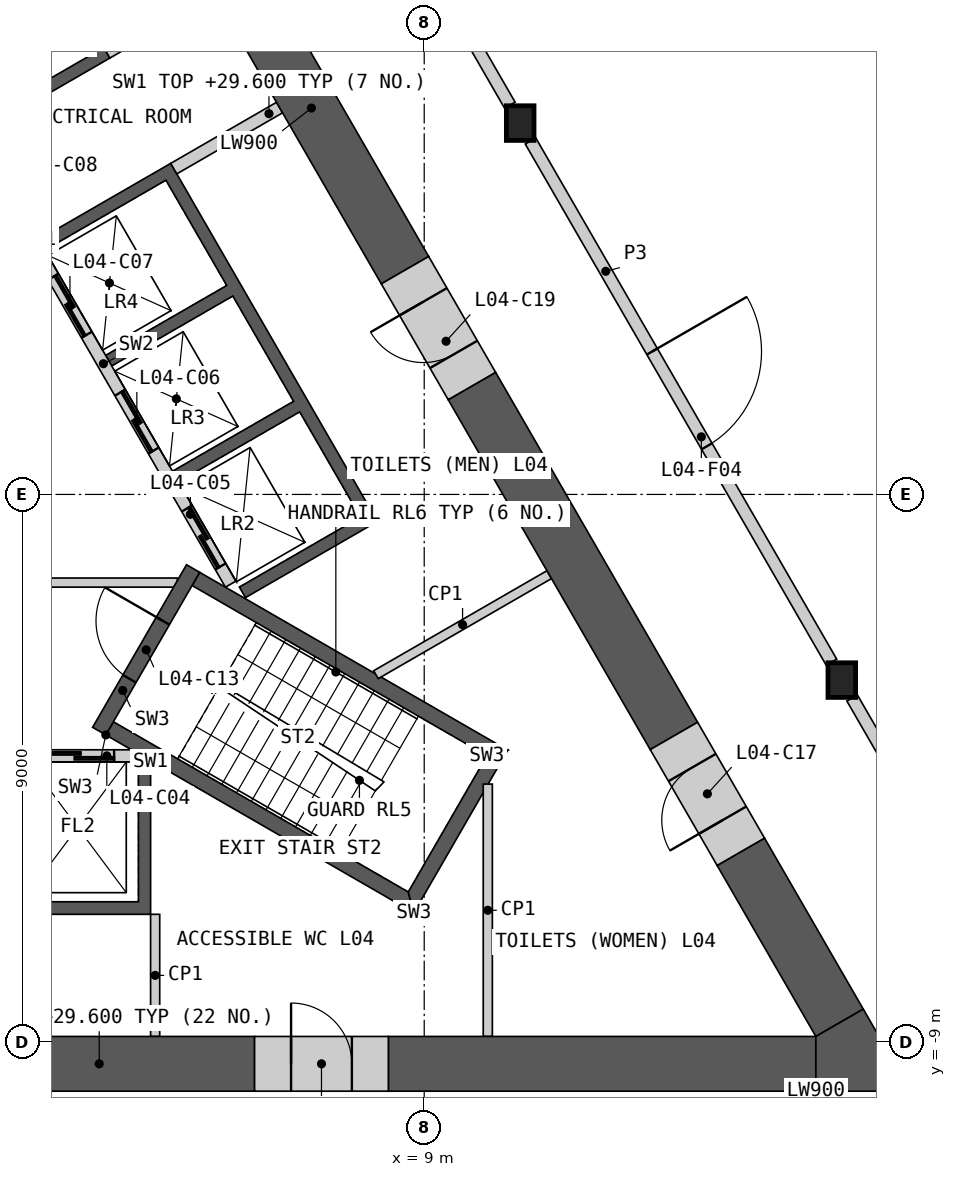
"""IFC4 building model, lengths in metres.
Left out: names, types, materials, properties, quantities, classifications, styles, units other than length and angle.
Written with IfcOpenShell. Run it as: python <this file> out.ifc"""

import sys

from ifc_helpers import new_model, si_unit, direction, frame, frame_2d, origin, origin_2d, place, context, subcontext, project, spatial, polyline, rectangle, i_section, outline, extrude, element, fill, save


model = new_model("IFC4")
c1 = context("Model", 3, precision=1e-05, world=origin(), true_north=direction((0.0, 1.0)))
c2 = subcontext(c1, "Body", "Model", "MODEL_VIEW")
j1 = project(units=[si_unit("LENGTHUNIT", "METRE"), si_unit("PLANEANGLEUNIT", "RADIAN")], contexts=[c1])
p1 = place(None, origin())
s1 = spatial("IfcSite", under=j1, at=p1, CompositionType="ELEMENT")
p2 = place(p1, origin())
s2 = spatial("IfcBuilding", under=s1, at=p2, CompositionType="ELEMENT")
p3 = place(p2, frame((0.0, 0.0, 25.5)))
s3 = spatial("IfcBuildingStorey", under=s2, at=p3, CompositionType="ELEMENT", Elevation=25.5)
for number, where, z_axis, x_axis in (
    (1, (15.868, -3.054, 0.0), (0.0, 0.0, 1.0), (1.0, 0.0, 0.0)),
    (2, (10.578, 6.107, 0.0), (0.0, 0.0, 1.0), (1.0, 0.0, 0.0)),
):
    element("IfcColumn", number, at=place(p3, frame(where, z_axis=z_axis, x_axis=x_axis)), inside=s3, PredefinedType="COLUMN", context=c2, shape_type="SweptSolid", body=[
        extrude(i_section(OverallWidth=0.454, OverallDepth=0.57, WebThickness=0.078, FlangeThickness=0.125, at=origin_2d()), origin(), (0.0, 0.0, 1.0), 4.5),
    ])
p4 = place(p3, origin())
e3 = element("IfcWall", 3, at=p4, inside=s3, PredefinedType="SHEAR", context=c2, shape_type="SweptSolid", body=[
    extrude(outline(polyline([(4.5, -4.4), (4.5, -6.906), (-4.5, -6.906), (-4.5, -4.4), (-4.3, -4.4), (-4.3, -6.7), (-2.3, -6.7), (-2.3, -4.4), (-2.1, -4.4), (-2.1, -6.7), (-0.1, -6.7), (-0.1, -4.4), (0.1, -4.4), (0.1, -6.7), (2.1, -6.7), (2.1, -4.4), (2.3, -4.4), (2.3, -6.7), (4.3, -6.7), (4.3, -4.4), (4.5, -4.4)])), origin(), (0.0, 0.0, 1.0), 4.1),
])
p5 = place(p3, frame((-4.187, -4.3, 0.0), z_axis=(0.0, 0.0, 1.0), x_axis=(1.0, 0.0, 0.0)))
e4 = element("IfcWall", 4, at=p5, inside=s3, PredefinedType="SOLIDWALL", context=c2, shape_type="SweptSolid", body=[
    extrude(rectangle(XDim=8.373, YDim=0.2, at=frame_2d((4.187, 0.0))), origin(), (0.0, 0.0, 1.0), 4.1),
])
p6 = place(p5, frame((0.287, 0.0, 0.0)))
e5 = element("IfcOpeningElement", 5, at=p6, cuts=e4, PredefinedType="OPENING", context=c2, shape_type="SweptSolid", body=[
    extrude(rectangle(XDim=1.2, YDim=2.1, at=frame_2d((0.6, 1.05))), frame((0.0, 0.11, 0.0), z_axis=(0.0, -1.0, 0.0), x_axis=(1.0, 0.0, 0.0)), (0.0, 0.0, 1.0), 0.22),
])
p7 = place(p5, frame((2.387, 0.0, 0.0)))
e6 = element("IfcOpeningElement", 6, at=p7, cuts=e4, PredefinedType="OPENING", context=c2, shape_type="SweptSolid", body=[
    extrude(rectangle(XDim=1.4, YDim=2.1, at=frame_2d((0.7, 1.05))), frame((0.0, 0.11, 0.0), z_axis=(0.0, -1.0, 0.0), x_axis=(1.0, 0.0, 0.0)), (0.0, 0.0, 1.0), 0.22),
])
p8 = place(p5, frame((4.737, 0.0, 0.0)))
e7 = element("IfcOpeningElement", 7, at=p8, cuts=e4, PredefinedType="OPENING", context=c2, shape_type="SweptSolid", body=[
    extrude(rectangle(XDim=1.1, YDim=2.1, at=frame_2d((0.55, 1.05))), frame((0.0, 0.11, 0.0), z_axis=(0.0, -1.0, 0.0), x_axis=(1.0, 0.0, 0.0)), (0.0, 0.0, 1.0), 0.22),
])
p9 = place(p5, frame((6.887, 0.0, 0.0)))
e8 = element("IfcOpeningElement", 8, at=p9, cuts=e4, PredefinedType="OPENING", context=c2, shape_type="SweptSolid", body=[
    extrude(rectangle(XDim=1.2, YDim=2.1, at=frame_2d((0.6, 1.05))), frame((0.0, 0.11, 0.0), z_axis=(0.0, -1.0, 0.0), x_axis=(1.0, 0.0, 0.0)), (0.0, 0.0, 1.0), 0.22),
])
p10 = place(p3, origin())
e9 = element("IfcWall", 9, at=p10, inside=s3, PredefinedType="SHEAR", context=c2, shape_type="SweptSolid", body=[
    extrude(outline(polyline([(1.561, 6.097), (3.731, 7.35), (3.831, 7.177), (1.66, 5.924), (1.561, 6.097)])), origin(), (0.0, 0.0, 1.0), 4.1),
])
p11 = place(p3, origin())
e10 = element("IfcWall", 10, at=p11, inside=s3, PredefinedType="SHEAR", context=c2, shape_type="SweptSolid", body=[
    extrude(outline(polyline([(2.66, 4.192), (4.831, 5.445), (8.231, -0.444), (6.061, -1.697), (5.96, -1.524), (7.952, -0.374), (6.952, 1.358), (4.96, 0.208), (4.861, 0.381), (6.852, 1.531), (5.852, 3.263), (3.861, 2.113), (3.76, 2.287), (5.752, 3.437), (4.752, 5.169), (2.76, 4.019), (2.66, 4.192)])), origin(), (0.0, 0.0, 1.0), 4.1),
])
p12 = place(p3, frame((5.817, -1.476, 0.0), z_axis=(0.0, 0.0, 1.0), x_axis=(-0.500002616675, 0.866023893041, 0.0)))
e11 = element("IfcWall", 11, at=p12, inside=s3, PredefinedType="SOLIDWALL", context=c2, shape_type="SweptSolid", body=[
    extrude(rectangle(XDim=8.373, YDim=0.2, at=frame_2d((4.187, 0.0))), origin(), (0.0, 0.0, 1.0), 4.1),
])
p13 = place(p12, frame((0.337, 0.0, 0.0)))
e12 = element("IfcOpeningElement", 12, at=p13, cuts=e11, PredefinedType="OPENING", context=c2, shape_type="SweptSolid", body=[
    extrude(rectangle(XDim=1.1, YDim=2.1, at=frame_2d((0.55, 1.05))), frame((0.0, 0.11, 0.0), z_axis=(0.0, -1.0, 0.0), x_axis=(1.0, 0.0, 0.0)), (0.0, 0.0, 1.0), 0.22),
])
p14 = place(p12, frame((2.537, 0.0, 0.0)))
e13 = element("IfcOpeningElement", 13, at=p14, cuts=e11, PredefinedType="OPENING", context=c2, shape_type="SweptSolid", body=[
    extrude(rectangle(XDim=1.1, YDim=2.1, at=frame_2d((0.55, 1.05))), frame((0.0, 0.11, 0.0), z_axis=(0.0, -1.0, 0.0), x_axis=(1.0, 0.0, 0.0)), (0.0, 0.0, 1.0), 0.22),
])
p15 = place(p12, frame((4.737, 0.0, 0.0)))
e14 = element("IfcOpeningElement", 14, at=p15, cuts=e11, PredefinedType="OPENING", context=c2, shape_type="SweptSolid", body=[
    extrude(rectangle(XDim=1.1, YDim=2.1, at=frame_2d((0.55, 1.05))), frame((0.0, 0.11, 0.0), z_axis=(0.0, -1.0, 0.0), x_axis=(1.0, 0.0, 0.0)), (0.0, 0.0, 1.0), 0.22),
])
p16 = place(p12, frame((7.037, 0.0, 0.0)))
e15 = element("IfcOpeningElement", 15, at=p16, cuts=e11, PredefinedType="OPENING", context=c2, shape_type="SweptSolid", body=[
    extrude(rectangle(XDim=0.9, YDim=2.1, at=frame_2d((0.45, 1.05))), frame((0.0, 0.11, 0.0), z_axis=(0.0, -1.0, 0.0), x_axis=(1.0, 0.0, 0.0)), (0.0, 0.0, 1.0), 0.22),
])
p17 = place(p3, frame((4.881, 5.358, 0.0), z_axis=(0.0, 0.0, 1.0), x_axis=(0.866035824272, 0.499981950752, 0.0)))
e16 = element("IfcWall", 16, at=p17, inside=s3, PredefinedType="SHEAR", context=c2, shape_type="SweptSolid", body=[
    extrude(rectangle(XDim=2.009, YDim=0.2, at=frame_2d((1.004, 0.0))), origin(), (0.0, 0.0, 1.0), 4.1),
])
p18 = place(p3, frame((3.781, 7.263, 0.0), z_axis=(0.0, 0.0, 1.0), x_axis=(0.865983199114, 0.50007309351, 0.0)))
e17 = element("IfcWall", 17, at=p18, inside=s3, PredefinedType="SHEAR", context=c2, shape_type="SweptSolid", body=[
    extrude(rectangle(XDim=2.009, YDim=0.2, at=frame_2d((1.004, 0.0))), origin(), (0.0, 0.0, 1.0), 4.1),
])
p19 = place(p3, frame((-4.941, -1.45, 0.0), z_axis=(0.0, 0.0, 1.0), x_axis=(1.0, 0.0, 0.0)))
e18 = element("IfcWall", 18, at=p19, inside=s3, PredefinedType="PARTITIONING", context=c2, shape_type="SweptSolid", body=[
    extrude(rectangle(XDim=9.882, YDim=0.15, at=frame_2d((4.941, 0.0))), origin(), (0.0, 0.0, 1.0), 4.1),
])
p20 = place(p19, frame((4.391, 0.0, 0.0)))
e19 = element("IfcOpeningElement", 19, at=p20, cuts=e18, PredefinedType="OPENING", context=c2, shape_type="SweptSolid", body=[
    extrude(rectangle(XDim=1.1, YDim=2.1, at=frame_2d((0.55, 1.05))), frame((0.0, 0.085, 0.0), z_axis=(0.0, -1.0, 0.0), x_axis=(1.0, 0.0, 0.0)), (0.0, 0.0, 1.0), 0.17),
])
p21 = place(p3, origin())
e20 = element("IfcWall", 20, at=p21, inside=s3, PredefinedType="SHEAR", context=c2, shape_type="SweptSolid", body=[
    extrude(outline(polyline([(3.763, -3.956), (8.83, -6.881), (8.738, -6.539), (3.888, -3.739), (3.763, -3.956)])), origin(), (0.0, 0.0, 1.0), 4.1),
])
p22 = place(p3, origin())
e21 = element("IfcWall", 21, at=p22, inside=s3, PredefinedType="SHEAR", context=c2, shape_type="SweptSolid", body=[
    extrude(outline(polyline([(8.83, -6.881), (10.374, -4.206), (10.032, -4.298), (8.738, -6.539), (8.83, -6.881)])), origin(), (0.0, 0.0, 1.0), 4.1),
])
p23 = place(p3, origin())
e22 = element("IfcWall", 22, at=p23, inside=s3, PredefinedType="SHEAR", context=c2, shape_type="SweptSolid", body=[
    extrude(outline(polyline([(10.032, -4.298), (10.374, -4.206), (5.307, -1.281), (5.182, -1.498), (10.032, -4.298)])), origin(), (0.0, 0.0, 1.0), 4.1),
])
p24 = place(p3, frame((3.655, -3.893, 0.0), z_axis=(0.0, 0.0, 1.0), x_axis=(0.499982516597, 0.866035497597, 0.0)))
e23 = element("IfcWall", 23, at=p24, inside=s3, PredefinedType="SHEAR", context=c2, shape_type="SweptSolid", body=[
    extrude(rectangle(XDim=3.088, YDim=0.25, at=frame_2d((1.544, 0.0))), origin(), (0.0, 0.0, 1.0), 4.1),
])
p25 = place(p24, frame((0.994, 0.0, 0.0)))
e24 = element("IfcOpeningElement", 24, at=p25, cuts=e23, PredefinedType="OPENING", context=c2, shape_type="SweptSolid", body=[
    extrude(rectangle(XDim=1.1, YDim=2.1, at=frame_2d((0.55, 1.05))), frame((0.0, 0.135, 0.0), z_axis=(0.0, -1.0, 0.0), x_axis=(1.0, 0.0, 0.0)), (0.0, 0.0, 1.0), 0.27),
])
p26 = place(p3, frame((4.575, -6.906, 0.0), z_axis=(0.0, 0.0, 1.0), x_axis=(0.0, -1.0, 0.0)))
e25 = element("IfcWall", 25, at=p26, inside=s3, PredefinedType="PARTITIONING", context=c2, shape_type="SweptSolid", body=[
    extrude(rectangle(XDim=2.009, YDim=0.15, at=frame_2d((1.004, 0.0))), origin(), (0.0, 0.0, 1.0), 4.1),
])
p27 = place(p3, frame((11.056, -1.32, 0.0), z_axis=(0.0, 0.0, 1.0), x_axis=(-0.866038565219, -0.499977203034, 0.0)))
e26 = element("IfcWall", 26, at=p27, inside=s3, PredefinedType="PARTITIONING", context=c2, shape_type="SweptSolid", body=[
    extrude(rectangle(XDim=3.291, YDim=0.15, at=frame_2d((1.646, 0.0))), origin(), (0.0, 0.0, 1.0), 4.1),
])
p28 = place(p3, frame((10.046, -8.915, 0.0), z_axis=(0.0, 0.0, 1.0), x_axis=(0.0, 1.0, 0.0)))
e27 = element("IfcWall", 27, at=p28, inside=s3, PredefinedType="PARTITIONING", context=c2, shape_type="SweptSolid", body=[
    extrude(rectangle(XDim=4.151, YDim=0.15, at=frame_2d((2.075, 0.0))), origin(), (0.0, 0.0, 1.0), 4.1),
])
p29 = place(p3, frame((8.41, -9.365, 0.0), z_axis=(0.0, 0.0, 1.0), x_axis=(1.0, 0.0, 0.0)))
e28 = element("IfcWall", 28, at=p29, inside=s3, PredefinedType="SHEAR", context=c2, shape_type="SweptSolid", body=[
    extrude(rectangle(XDim=7.031, YDim=0.9, at=frame_2d((3.515, 0.0))), origin(), (0.0, 0.0, 1.0), 4.1),
])
p30 = place(p3, frame((1.1, -9.365, 0.0), z_axis=(0.0, 0.0, 1.0), x_axis=(1.0, 0.0, 0.0)))
e29 = element("IfcWall", 29, at=p30, inside=s3, PredefinedType="SHEAR", context=c2, shape_type="SweptSolid", body=[
    extrude(rectangle(XDim=5.11, YDim=0.9, at=frame_2d((2.555, 0.0))), origin(), (0.0, 0.0, 1.0), 4.1),
])
p31 = place(p3, frame((13.107, -3.972, 0.0), z_axis=(0.0, 0.0, 1.0), x_axis=(-0.49998745675, 0.866032645512, 0.0)))
e30 = element("IfcWall", 30, at=p31, inside=s3, PredefinedType="SHEAR", context=c2, shape_type="SweptSolid", body=[
    extrude(rectangle(XDim=6.646, YDim=0.9, at=frame_2d((3.323, 0.0))), origin(), (0.0, 0.0, 1.0), 4.1),
])
p32 = place(p3, frame((8.684, 3.688, 0.0), z_axis=(0.0, 0.0, 1.0), x_axis=(-0.499990189338, 0.866031067899, 0.0)))
e31 = element("IfcWall", 31, at=p32, inside=s3, PredefinedType="SHEAR", context=c2, shape_type="SweptSolid", body=[
    extrude(rectangle(XDim=6.157, YDim=0.9, at=frame_2d((3.078, 0.0))), origin(), (0.0, 0.0, 1.0), 4.1),
])
p33 = place(p3, frame((15.831, -8.69, 0.0), z_axis=(0.0, 0.0, 1.0), x_axis=(-0.499963215419, 0.866046640331, 0.0)))
e32 = element("IfcWall", 32, at=p33, inside=s3, PredefinedType="SHEAR", context=c2, shape_type="SweptSolid", body=[
    extrude(rectangle(XDim=3.248, YDim=0.9, at=frame_2d((1.624, 0.0))), origin(), (0.0, 0.0, 1.0), 4.1),
])
p34 = place(p3, origin())
e33 = element("IfcWall", 33, at=p34, inside=s3, PredefinedType="SHEAR", context=c2, shape_type="SweptSolid", body=[
    extrude(outline(polyline([(15.441, -9.815), (15.441, -8.915), (16.221, -8.465), (17.0, -9.815), (15.441, -9.815)])), origin(), (0.0, 0.0, 1.0), 4.1),
])
p35 = place(p3, frame((6.21, -9.365, 0.0), z_axis=(0.0, 0.0, 1.0), x_axis=(1.0, 0.0, 0.0)))
e34 = element("IfcWall", 34, at=p35, inside=s3, PredefinedType="SHEAR", context=c2, shape_type="SweptSolid", body=[
    extrude(rectangle(XDim=2.2, YDim=0.9, at=frame_2d((1.1, 0.0))), origin(), (0.0, 0.0, 1.0), 4.1),
])
p36 = place(p35, frame((0.6, 0.0, 0.0)))
e35 = element("IfcOpeningElement", 35, at=p36, cuts=e34, PredefinedType="OPENING", context=c2, shape_type="SweptSolid", body=[
    extrude(rectangle(XDim=1.0, YDim=2.1, at=frame_2d((0.5, 1.05))), frame((0.0, 0.46, 0.0), z_axis=(0.0, -1.0, 0.0), x_axis=(1.0, 0.0, 0.0)), (0.0, 0.0, 1.0), 0.92),
])
p37 = place(p3, frame((14.207, -5.877, 0.0), z_axis=(0.0, 0.0, 1.0), x_axis=(-0.500077893725, 0.86598042715, 0.0)))
e36 = element("IfcWall", 36, at=p37, inside=s3, PredefinedType="SHEAR", context=c2, shape_type="SweptSolid", body=[
    extrude(rectangle(XDim=2.2, YDim=0.9, at=frame_2d((1.1, 0.0))), origin(), (0.0, 0.0, 1.0), 4.1),
])
p38 = place(p37, frame((0.6, 0.0, 0.0)))
e37 = element("IfcOpeningElement", 37, at=p38, cuts=e36, PredefinedType="OPENING", context=c2, shape_type="SweptSolid", body=[
    extrude(rectangle(XDim=1.0, YDim=2.1, at=frame_2d((0.5, 1.05))), frame((0.0, 0.46, 0.0), z_axis=(0.0, -1.0, 0.0), x_axis=(1.0, 0.0, 0.0)), (0.0, 0.0, 1.0), 0.92),
])
p39 = place(p3, frame((9.784, 1.783, 0.0), z_axis=(0.0, 0.0, 1.0), x_axis=(-0.50002983664, 0.866008176907, 0.0)))
e38 = element("IfcWall", 38, at=p39, inside=s3, PredefinedType="SHEAR", context=c2, shape_type="SweptSolid", body=[
    extrude(rectangle(XDim=2.2, YDim=0.9, at=frame_2d((1.1, 0.0))), origin(), (0.0, 0.0, 1.0), 4.1),
])
p40 = place(p39, frame((0.6, 0.0, 0.0)))
e39 = element("IfcOpeningElement", 39, at=p40, cuts=e38, PredefinedType="OPENING", context=c2, shape_type="SweptSolid", body=[
    extrude(rectangle(XDim=1.0, YDim=2.1, at=frame_2d((0.5, 1.05))), frame((0.0, 0.46, 0.0), z_axis=(0.0, -1.0, 0.0), x_axis=(1.0, 0.0, 0.0)), (0.0, 0.0, 1.0), 0.92),
])
p41 = place(p3, frame((10.749, 5.813, 0.0), z_axis=(0.0, 0.0, 1.0), x_axis=(0.500004292778, -0.866022925334, 0.0)))
e40 = element("IfcWall", 40, at=p41, inside=s3, PredefinedType="PARTITIONING", context=c2, shape_type="SweptSolid", body=[
    extrude(rectangle(XDim=9.898, YDim=0.2, at=frame_2d((4.949, 0.0))), origin(), (0.0, 0.0, 1.0), 4.1),
])
p42 = place(p41, frame((3.998, 0.0, 0.0)))
e41 = element("IfcOpeningElement", 41, at=p42, cuts=e40, PredefinedType="OPENING", context=c2, shape_type="SweptSolid", body=[
    extrude(rectangle(XDim=1.8, YDim=2.1, at=frame_2d((0.9, 1.05))), frame((0.0, 0.11, 0.0), z_axis=(0.0, -1.0, 0.0), x_axis=(1.0, 0.0, 0.0)), (0.0, 0.0, 1.0), 0.22),
])
p43 = place(p3, frame((5.459, 14.974, 0.0), z_axis=(0.0, 0.0, 1.0), x_axis=(0.499985793049, -0.866033606016, 0.0)))
e42 = element("IfcWall", 42, at=p43, inside=s3, PredefinedType="PARTITIONING", context=c2, shape_type="SweptSolid", body=[
    extrude(rectangle(XDim=9.898, YDim=0.2, at=frame_2d((4.949, 0.0))), origin(), (0.0, 0.0, 1.0), 4.1),
])
p44 = place(p3, frame((16.038, -3.348, 0.0), z_axis=(0.0, 0.0, 1.0), x_axis=(0.499988314375, -0.866032150378, 0.0)))
e43 = element("IfcWall", 43, at=p44, inside=s3, PredefinedType="PARTITIONING", context=c2, shape_type="SweptSolid", body=[
    extrude(rectangle(XDim=6.412, YDim=0.2, at=frame_2d((3.206, 0.0))), origin(), (0.0, 0.0, 1.0), 4.1),
])
p45 = place(p9, origin())
e44 = element("IfcDoor", 44, at=p45, inside=s3, OperationType="SLIDING_TO_LEFT", PredefinedType="DOOR", context=c2, shape_type="SweptSolid", body=[
    extrude(rectangle(XDim=1.2, YDim=2.1, at=frame_2d((0.6, 1.05))), frame((0.0, 0.025, 0.0), z_axis=(0.0, -1.0, 0.0), x_axis=(1.0, 0.0, 0.0)), (0.0, 0.0, 1.0), 0.05),
])
fill(e8, e44)
p46 = place(p13, origin())
e45 = element("IfcDoor", 45, at=p46, inside=s3, OperationType="SLIDING_TO_LEFT", PredefinedType="DOOR", context=c2, shape_type="SweptSolid", body=[
    extrude(rectangle(XDim=1.1, YDim=2.1, at=frame_2d((0.55, 1.05))), frame((0.0, 0.025, 0.0), z_axis=(0.0, -1.0, 0.0), x_axis=(1.0, 0.0, 0.0)), (0.0, 0.0, 1.0), 0.05),
])
fill(e12, e45)
p47 = place(p14, origin())
e46 = element("IfcDoor", 46, at=p47, inside=s3, OperationType="SLIDING_TO_LEFT", PredefinedType="DOOR", context=c2, shape_type="SweptSolid", body=[
    extrude(rectangle(XDim=1.1, YDim=2.1, at=frame_2d((0.55, 1.05))), frame((0.0, 0.025, 0.0), z_axis=(0.0, -1.0, 0.0), x_axis=(1.0, 0.0, 0.0)), (0.0, 0.0, 1.0), 0.05),
])
fill(e13, e46)
p48 = place(p15, origin())
e47 = element("IfcDoor", 47, at=p48, inside=s3, OperationType="SLIDING_TO_LEFT", PredefinedType="DOOR", context=c2, shape_type="SweptSolid", body=[
    extrude(rectangle(XDim=1.1, YDim=2.1, at=frame_2d((0.55, 1.05))), frame((0.0, 0.025, 0.0), z_axis=(0.0, -1.0, 0.0), x_axis=(1.0, 0.0, 0.0)), (0.0, 0.0, 1.0), 0.05),
])
fill(e14, e47)
p49 = place(p25, origin())
e48 = element("IfcDoor", 48, at=p49, inside=s3, OperationType="SINGLE_SWING_RIGHT", PredefinedType="DOOR", context=c2, shape_type="SweptSolid", body=[
    extrude(rectangle(XDim=1.1, YDim=2.1, at=frame_2d((0.55, 1.05))), frame((0.0, 0.025, 0.0), z_axis=(0.0, -1.0, 0.0), x_axis=(1.0, 0.0, 0.0)), (0.0, 0.0, 1.0), 0.05),
])
fill(e24, e48)
p50 = place(p36, origin())
e49 = element("IfcDoor", 49, at=p50, inside=s3, OperationType="SINGLE_SWING_LEFT", PredefinedType="DOOR", context=c2, shape_type="SweptSolid", body=[
    extrude(rectangle(XDim=1.0, YDim=2.1, at=frame_2d((0.5, 1.05))), frame((0.0, 0.205, 0.0), z_axis=(0.0, -1.0, 0.0), x_axis=(1.0, 0.0, 0.0)), (0.0, 0.0, 1.0), 0.05),
])
fill(e35, e49)
p51 = place(p38, origin())
e50 = element("IfcDoor", 50, at=p51, inside=s3, OperationType="SINGLE_SWING_LEFT", PredefinedType="DOOR", context=c2, shape_type="SweptSolid", body=[
    extrude(rectangle(XDim=1.0, YDim=2.1, at=frame_2d((0.5, 1.05))), frame((0.0, 0.205, 0.0), z_axis=(0.0, -1.0, 0.0), x_axis=(1.0, 0.0, 0.0)), (0.0, 0.0, 1.0), 0.05),
])
fill(e37, e50)
p52 = place(p40, origin())
e51 = element("IfcDoor", 51, at=p52, inside=s3, OperationType="SINGLE_SWING_RIGHT", PredefinedType="DOOR", context=c2, shape_type="SweptSolid", body=[
    extrude(rectangle(XDim=1.0, YDim=2.1, at=frame_2d((0.5, 1.05))), frame((0.0, 0.205, 0.0), z_axis=(0.0, -1.0, 0.0), x_axis=(1.0, 0.0, 0.0)), (0.0, 0.0, 1.0), 0.05),
])
fill(e39, e51)
p53 = place(p42, origin())
e52 = element("IfcDoor", 52, at=p53, inside=s3, OperationType="DOUBLE_DOOR_SINGLE_SWING", PredefinedType="DOOR", context=c2, shape_type="SweptSolid", body=[
    extrude(rectangle(XDim=1.8, YDim=2.1, at=frame_2d((0.9, 1.05))), frame((0.0, 0.025, 0.0), z_axis=(0.0, -1.0, 0.0), x_axis=(1.0, 0.0, 0.0)), (0.0, 0.0, 1.0), 0.05),
])
fill(e41, e52)
save(model, sys.argv[1])
